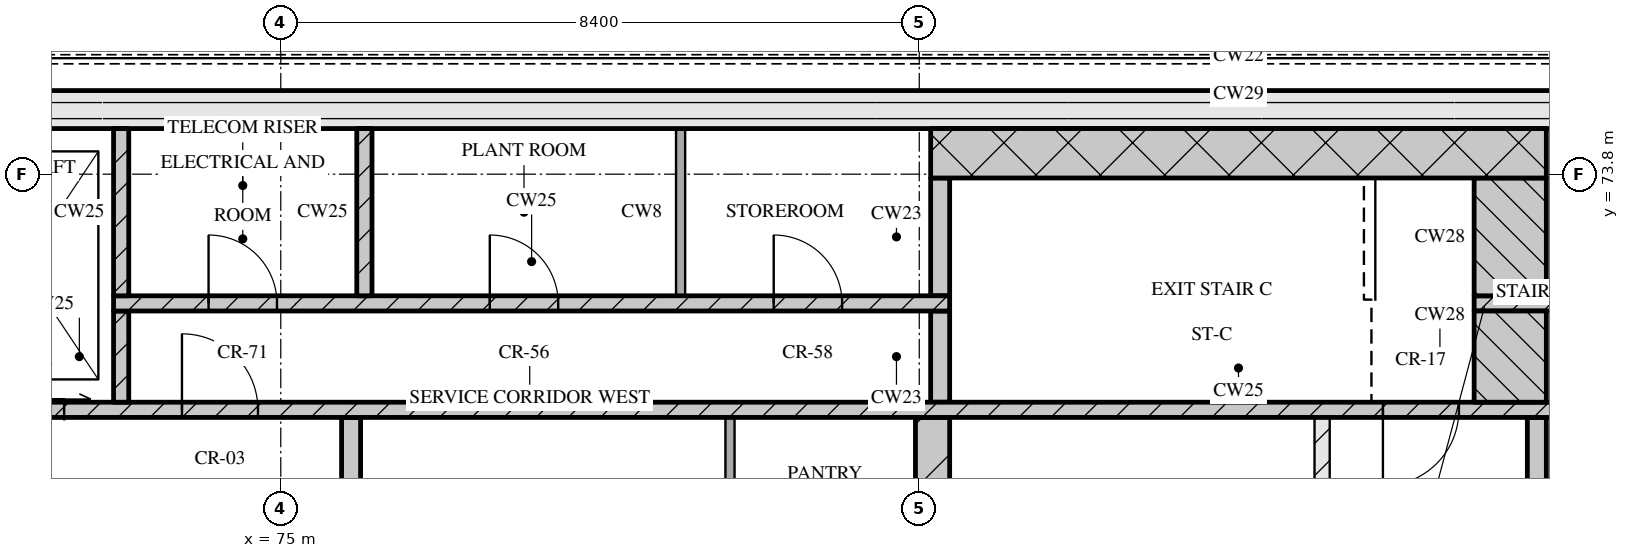
"""IFC4 building model, lengths in metres.
Left out: names, types, materials, properties, quantities, classifications, styles, units other than length and angle.
Written with IfcOpenShell. Run it as: python <this file> out.ifc"""

import sys

from ifc_helpers import new_model, si_unit, direction, frame, frame_2d, origin, place, context, subcontext, project, spatial, rectangle, extrude, element, fill, save


model = new_model("IFC4")
c1 = context("Model", 3, precision=1e-05, world=origin(), true_north=direction((0.0, 1.0)))
c2 = subcontext(c1, "Body", "Model", "MODEL_VIEW")
j1 = project(units=[si_unit("LENGTHUNIT", "METRE"), si_unit("PLANEANGLEUNIT", "RADIAN")], contexts=[c1])
p1 = place(None, origin())
s1 = spatial("IfcSite", under=j1, at=p1, CompositionType="ELEMENT")
p2 = place(p1, origin())
s2 = spatial("IfcBuilding", under=s1, at=p2, CompositionType="ELEMENT")
p3 = place(p2, frame((0.0, 0.0, 310.35)))
s3 = spatial("IfcBuildingStorey", under=s2, at=p3, CompositionType="ELEMENT", Elevation=310.35)
p4 = place(p3, frame((67.3, 74.65, 0.0), z_axis=(0.0, 0.0, 1.0), x_axis=(1.0, 0.0, 0.0)))
e1 = element("IfcWall", 1, at=p4, inside=s3, PredefinedType="SOLIDWALL", context=c2, shape_type="SweptSolid", body=[
    extrude(rectangle(XDim=40.6, YDim=0.5, at=frame_2d((20.3, 0.0))), origin(), (0.0, 0.0, 1.0), 4.2),
])
p5 = place(p3, frame((80.91, 68.0, 0.0), z_axis=(0.0, 0.0, 1.0), x_axis=(0.0, 1.0, 0.0)))
e2 = element("IfcWall", 2, at=p5, inside=s3, PredefinedType="PARTITIONING", context=c2, shape_type="SweptSolid", body=[
    extrude(rectangle(XDim=2.6, YDim=0.12, at=frame_2d((1.3, 0.0))), origin(), (0.0, 0.0, 1.0), 4.2),
])
p6 = place(p3, frame((83.575, 68.0, 0.0), z_axis=(0.0, 0.0, 1.0), x_axis=(0.0, 1.0, 0.0)))
e3 = element("IfcWall", 3, at=p6, inside=s3, PredefinedType="SOLIDWALL", context=c2, shape_type="SweptSolid", body=[
    extrude(rectangle(XDim=2.6, YDim=0.45, at=frame_2d((1.3, 0.0))), origin(), (0.0, 0.0, 1.0), 4.2),
])
p7 = place(p3, frame((88.7, 68.0, 0.0), z_axis=(0.0, 0.0, 1.0), x_axis=(0.0, 1.0, 0.0)))
e4 = element("IfcWall", 4, at=p7, inside=s3, PredefinedType="PARTITIONING", context=c2, shape_type="SweptSolid", body=[
    extrude(rectangle(XDim=2.6, YDim=0.2, at=frame_2d((1.3, 0.0))), origin(), (0.0, 0.0, 1.0), 4.2),
])
p8 = place(p3, frame((91.525, 68.0, 0.0), z_axis=(0.0, 0.0, 1.0), x_axis=(0.0, 1.0, 0.0)))
e5 = element("IfcWall", 5, at=p8, inside=s3, PredefinedType="SOLIDWALL", context=c2, shape_type="SweptSolid", body=[
    extrude(rectangle(XDim=2.6, YDim=0.25, at=frame_2d((1.3, 0.0))), origin(), (0.0, 0.0, 1.0), 4.2),
])
p9 = place(p3, frame((75.925, 68.3, 0.0), z_axis=(0.0, 0.0, 1.0), x_axis=(0.0, 1.0, 0.0)))
e6 = element("IfcWall", 6, at=p9, inside=s3, PredefinedType="SOLIDWALL", context=c2, shape_type="SweptSolid", body=[
    extrude(rectangle(XDim=2.3, YDim=0.25, at=frame_2d((1.15, 0.0))), origin(), (0.0, 0.0, 1.0), 4.2),
])
p10 = place(p3, frame((67.8, 70.7, 0.0), z_axis=(0.0, 0.0, 1.0), x_axis=(1.0, 0.0, 0.0)))
e7 = element("IfcWall", 7, at=p10, inside=s3, PredefinedType="SOLIDWALL", context=c2, shape_type="SweptSolid", body=[
    extrude(rectangle(XDim=39.6, YDim=0.2, at=frame_2d((19.8, 0.0))), origin(), (0.0, 0.0, 1.0), 4.2),
])
p11 = place(p10, frame((0.65, 0.0, 0.0)))
e8 = element("IfcOpeningElement", 8, at=p11, cuts=e7, PredefinedType="OPENING", context=c2, shape_type="SweptSolid", body=[
    extrude(rectangle(XDim=1.1, YDim=2.1, at=frame_2d((0.55, 1.05))), frame((0.0, 0.11, 0.0), z_axis=(0.0, -1.0, 0.0), x_axis=(1.0, 0.0, 0.0)), (0.0, 0.0, 1.0), 0.22),
])
p12 = place(p10, frame((3.25, 0.0, 0.0)))
e9 = element("IfcOpeningElement", 9, at=p12, cuts=e7, PredefinedType="OPENING", context=c2, shape_type="SweptSolid", body=[
    extrude(rectangle(XDim=1.1, YDim=2.1, at=frame_2d((0.55, 1.05))), frame((0.0, 0.11, 0.0), z_axis=(0.0, -1.0, 0.0), x_axis=(1.0, 0.0, 0.0)), (0.0, 0.0, 1.0), 0.22),
])
p13 = place(p10, frame((5.9, 0.0, 0.0)))
e10 = element("IfcOpeningElement", 10, at=p13, cuts=e7, PredefinedType="OPENING", context=c2, shape_type="SweptSolid", body=[
    extrude(rectangle(XDim=1.0, YDim=2.1, at=frame_2d((0.5, 1.05))), frame((0.0, 0.11, 0.0), z_axis=(0.0, -1.0, 0.0), x_axis=(1.0, 0.0, 0.0)), (0.0, 0.0, 1.0), 0.22),
])
p14 = place(p10, frame((21.7, 0.0, 0.0)))
e11 = element("IfcOpeningElement", 11, at=p14, cuts=e7, PredefinedType="OPENING", context=c2, shape_type="SweptSolid", body=[
    extrude(rectangle(XDim=1.0, YDim=2.1, at=frame_2d((0.5, 1.05))), frame((0.0, 0.11, 0.0), z_axis=(0.0, -1.0, 0.0), x_axis=(1.0, 0.0, 0.0)), (0.0, 0.0, 1.0), 0.22),
])
p15 = place(p10, frame((32.7, 0.0, 0.0)))
e12 = element("IfcOpeningElement", 12, at=p15, cuts=e7, PredefinedType="OPENING", context=c2, shape_type="SweptSolid", body=[
    extrude(rectangle(XDim=1.0, YDim=2.1, at=frame_2d((0.5, 1.05))), frame((0.0, 0.11, 0.0), z_axis=(0.0, -1.0, 0.0), x_axis=(1.0, 0.0, 0.0)), (0.0, 0.0, 1.0), 0.22),
])
p16 = place(p10, frame((35.25, 0.0, 0.0)))
e13 = element("IfcOpeningElement", 13, at=p16, cuts=e7, PredefinedType="OPENING", context=c2, shape_type="SweptSolid", body=[
    extrude(rectangle(XDim=1.1, YDim=2.1, at=frame_2d((0.55, 1.05))), frame((0.0, 0.11, 0.0), z_axis=(0.0, -1.0, 0.0), x_axis=(1.0, 0.0, 0.0)), (0.0, 0.0, 1.0), 0.22),
])
p17 = place(p10, frame((37.85, 0.0, 0.0)))
e14 = element("IfcOpeningElement", 14, at=p17, cuts=e7, PredefinedType="OPENING", context=c2, shape_type="SweptSolid", body=[
    extrude(rectangle(XDim=1.1, YDim=2.1, at=frame_2d((0.55, 1.05))), frame((0.0, 0.11, 0.0), z_axis=(0.0, -1.0, 0.0), x_axis=(1.0, 0.0, 0.0)), (0.0, 0.0, 1.0), 0.22),
])
p18 = place(p3, frame((72.9, 70.8, 0.0), z_axis=(0.0, 0.0, 1.0), x_axis=(0.0, 1.0, 0.0)))
e15 = element("IfcWall", 15, at=p18, inside=s3, PredefinedType="SOLIDWALL", context=c2, shape_type="SweptSolid", body=[
    extrude(rectangle(XDim=1.2, YDim=0.2, at=frame_2d((0.6, 0.0))), origin(), (0.0, 0.0, 1.0), 4.2),
])
p19 = place(p3, frame((83.675, 70.8, 0.0), z_axis=(0.0, 0.0, 1.0), x_axis=(0.0, 1.0, 0.0)))
e16 = element("IfcWall", 16, at=p19, inside=s3, PredefinedType="SOLIDWALL", context=c2, shape_type="SweptSolid", body=[
    extrude(rectangle(XDim=1.2, YDim=0.25, at=frame_2d((0.6, 0.0))), origin(), (0.0, 0.0, 1.0), 4.2),
])
p20 = place(p3, frame((91.175, 70.8, 0.0), z_axis=(0.0, 0.0, 1.0), x_axis=(0.0, 1.0, 0.0)))
e17 = element("IfcWall", 17, at=p20, inside=s3, PredefinedType="SOLIDWALL", context=c2, shape_type="SweptSolid", body=[
    extrude(rectangle(XDim=1.2, YDim=0.95, at=frame_2d((0.6, 0.0))), origin(), (0.0, 0.0, 1.0), 4.2),
])
p21 = place(p3, frame((72.8, 72.1, 0.0), z_axis=(0.0, 0.0, 1.0), x_axis=(1.0, 0.0, 0.0)))
e18 = element("IfcWall", 18, at=p21, inside=s3, PredefinedType="SOLIDWALL", context=c2, shape_type="SweptSolid", body=[
    extrude(rectangle(XDim=11.0, YDim=0.2, at=frame_2d((5.5, 0.0))), origin(), (0.0, 0.0, 1.0), 4.2),
])
p22 = place(p21, frame((1.25, 0.0, 0.0)))
e19 = element("IfcOpeningElement", 19, at=p22, cuts=e18, PredefinedType="OPENING", context=c2, shape_type="SweptSolid", body=[
    extrude(rectangle(XDim=0.9, YDim=2.1, at=frame_2d((0.45, 1.05))), frame((0.0, 0.11, 0.0), z_axis=(0.0, -1.0, 0.0), x_axis=(1.0, 0.0, 0.0)), (0.0, 0.0, 1.0), 0.22),
])
p23 = place(p21, frame((4.95, 0.0, 0.0)))
e20 = element("IfcOpeningElement", 20, at=p23, cuts=e18, PredefinedType="OPENING", context=c2, shape_type="SweptSolid", body=[
    extrude(rectangle(XDim=0.9, YDim=2.1, at=frame_2d((0.45, 1.05))), frame((0.0, 0.11, 0.0), z_axis=(0.0, -1.0, 0.0), x_axis=(1.0, 0.0, 0.0)), (0.0, 0.0, 1.0), 0.22),
])
p24 = place(p21, frame((8.685, 0.0, 0.0)))
e21 = element("IfcOpeningElement", 21, at=p24, cuts=e18, PredefinedType="OPENING", context=c2, shape_type="SweptSolid", body=[
    extrude(rectangle(XDim=0.9, YDim=2.1, at=frame_2d((0.45, 1.05))), frame((0.0, 0.11, 0.0), z_axis=(0.0, -1.0, 0.0), x_axis=(1.0, 0.0, 0.0)), (0.0, 0.0, 1.0), 0.22),
])
p25 = place(p3, frame((90.7, 72.1, 0.0), z_axis=(0.0, 0.0, 1.0), x_axis=(1.0, 0.0, 0.0)))
e22 = element("IfcWall", 22, at=p25, inside=s3, PredefinedType="SOLIDWALL", context=c2, shape_type="SweptSolid", body=[
    extrude(rectangle(XDim=11.7, YDim=0.2, at=frame_2d((5.85, 0.0))), origin(), (0.0, 0.0, 1.0), 4.2),
])
p26 = place(p25, frame((4.175, 0.0, 0.0)))
e23 = element("IfcOpeningElement", 23, at=p26, cuts=e22, PredefinedType="OPENING", context=c2, shape_type="SweptSolid", body=[
    extrude(rectangle(XDim=0.9, YDim=2.1, at=frame_2d((0.45, 1.05))), frame((0.0, 0.11, 0.0), z_axis=(0.0, -1.0, 0.0), x_axis=(1.0, 0.0, 0.0)), (0.0, 0.0, 1.0), 0.22),
])
p27 = place(p25, frame((9.55, 0.0, 0.0)))
e24 = element("IfcOpeningElement", 24, at=p27, cuts=e22, PredefinedType="OPENING", context=c2, shape_type="SweptSolid", body=[
    extrude(rectangle(XDim=0.9, YDim=2.1, at=frame_2d((0.45, 1.05))), frame((0.0, 0.11, 0.0), z_axis=(0.0, -1.0, 0.0), x_axis=(1.0, 0.0, 0.0)), (0.0, 0.0, 1.0), 0.22),
])
for number, where, z_axis, x_axis in (
    (25, (72.9, 72.2, 0.0), (0.0, 0.0, 1.0), (0.0, 1.0, 0.0)),
    (26, (76.1, 72.2, 0.0), (0.0, 0.0, 1.0), (0.0, 1.0, 0.0)),
):
    element("IfcWall", number, at=place(p3, frame(where, z_axis=z_axis, x_axis=x_axis)), inside=s3, PredefinedType="SOLIDWALL", context=c2, shape_type="SweptSolid", body=[
        extrude(rectangle(XDim=2.2, YDim=0.2, at=frame_2d((1.1, 0.0))), origin(), (0.0, 0.0, 1.0), 4.2),
    ])
p28 = place(p3, frame((80.26, 72.2, 0.0), z_axis=(0.0, 0.0, 1.0), x_axis=(0.0, 1.0, 0.0)))
e27 = element("IfcWall", 27, at=p28, inside=s3, PredefinedType="PARTITIONING", context=c2, shape_type="SweptSolid", body=[
    extrude(rectangle(XDim=2.2, YDim=0.12, at=frame_2d((1.1, 0.0))), origin(), (0.0, 0.0, 1.0), 4.2),
])
p29 = place(p3, frame((83.675, 72.2, 0.0), z_axis=(0.0, 0.0, 1.0), x_axis=(0.0, 1.0, 0.0)))
e28 = element("IfcWall", 28, at=p29, inside=s3, PredefinedType="SOLIDWALL", context=c2, shape_type="SweptSolid", body=[
    extrude(rectangle(XDim=1.55, YDim=0.25, at=frame_2d((0.775, 0.0))), origin(), (0.0, 0.0, 1.0), 4.2),
])
p30 = place(p3, frame((91.175, 72.2, 0.0), z_axis=(0.0, 0.0, 1.0), x_axis=(0.0, 1.0, 0.0)))
e29 = element("IfcWall", 29, at=p30, inside=s3, PredefinedType="SOLIDWALL", context=c2, shape_type="SweptSolid", body=[
    extrude(rectangle(XDim=1.55, YDim=0.95, at=frame_2d((0.775, 0.0))), origin(), (0.0, 0.0, 1.0), 4.2),
])
p31 = place(p3, frame((83.55, 74.075, 0.0), z_axis=(0.0, 0.0, 1.0), x_axis=(1.0, 0.0, 0.0)))
e30 = element("IfcWall", 30, at=p31, inside=s3, PredefinedType="SOLIDWALL", context=c2, shape_type="SweptSolid", body=[
    extrude(rectangle(XDim=8.1, YDim=0.65, at=frame_2d((4.05, 0.0))), origin(), (0.0, 0.0, 1.0), 4.2),
])
p32 = place(p12, origin())
e31 = element("IfcDoor", 31, at=p32, inside=s3, OperationType="SLIDING_TO_RIGHT", PredefinedType="DOOR", context=c2, shape_type="SweptSolid", body=[
    extrude(rectangle(XDim=1.1, YDim=2.1, at=frame_2d((0.55, 1.05))), frame((0.0, 0.025, 0.0), z_axis=(0.0, -1.0, 0.0), x_axis=(1.0, 0.0, 0.0)), (0.0, 0.0, 1.0), 0.05),
])
fill(e9, e31)
p33 = place(p13, origin())
e32 = element("IfcDoor", 32, at=p33, inside=s3, OperationType="SINGLE_SWING_LEFT", PredefinedType="DOOR", context=c2, shape_type="SweptSolid", body=[
    extrude(rectangle(XDim=1.0, YDim=2.1, at=frame_2d((0.5, 1.05))), frame((0.0, 0.025, 0.0), z_axis=(0.0, -1.0, 0.0), x_axis=(1.0, 0.0, 0.0)), (0.0, 0.0, 1.0), 0.05),
])
fill(e10, e32)
p34 = place(p14, origin())
e33 = element("IfcDoor", 33, at=p34, inside=s3, OperationType="SINGLE_SWING_RIGHT", PredefinedType="DOOR", context=c2, shape_type="SweptSolid", body=[
    extrude(rectangle(XDim=1.0, YDim=2.1, at=frame_2d((0.5, 1.05))), frame((0.0, 0.025, 0.0), z_axis=(0.0, -1.0, 0.0), x_axis=(1.0, 0.0, 0.0)), (0.0, 0.0, 1.0), 0.05),
])
fill(e11, e33)
p35 = place(p22, origin())
e34 = element("IfcDoor", 34, at=p35, inside=s3, OperationType="SINGLE_SWING_LEFT", PredefinedType="DOOR", context=c2, shape_type="SweptSolid", body=[
    extrude(rectangle(XDim=0.9, YDim=2.1, at=frame_2d((0.45, 1.05))), frame((0.0, 0.025, 0.0), z_axis=(0.0, -1.0, 0.0), x_axis=(1.0, 0.0, 0.0)), (0.0, 0.0, 1.0), 0.05),
])
fill(e19, e34)
p36 = place(p23, origin())
e35 = element("IfcDoor", 35, at=p36, inside=s3, OperationType="SINGLE_SWING_LEFT", PredefinedType="DOOR", context=c2, shape_type="SweptSolid", body=[
    extrude(rectangle(XDim=0.9, YDim=2.1, at=frame_2d((0.45, 1.05))), frame((0.0, 0.025, 0.0), z_axis=(0.0, -1.0, 0.0), x_axis=(1.0, 0.0, 0.0)), (0.0, 0.0, 1.0), 0.05),
])
fill(e20, e35)
p37 = place(p24, origin())
e36 = element("IfcDoor", 36, at=p37, inside=s3, OperationType="SINGLE_SWING_LEFT", PredefinedType="DOOR", context=c2, shape_type="SweptSolid", body=[
    extrude(rectangle(XDim=0.9, YDim=2.1, at=frame_2d((0.45, 1.05))), frame((0.0, 0.025, 0.0), z_axis=(0.0, -1.0, 0.0), x_axis=(1.0, 0.0, 0.0)), (0.0, 0.0, 1.0), 0.05),
])
fill(e21, e36)
save(model, sys.argv[1])
